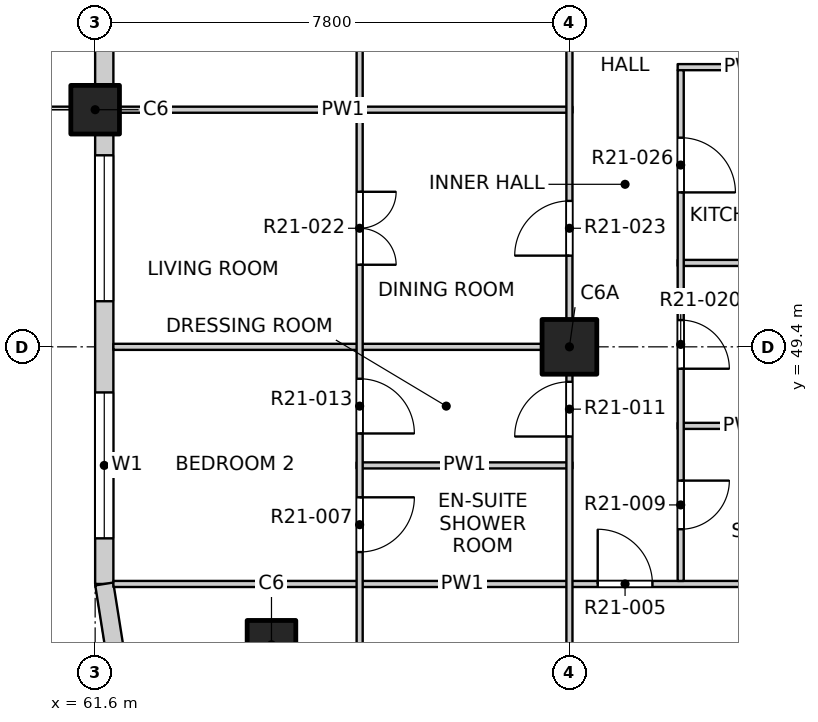
"""IFC4 building model, lengths in metres.
Left out: names, types, materials, properties, quantities, classifications, styles, units other than length and angle.
Written with IfcOpenShell. Run it as: python <this file> out.ifc"""

import sys

from ifc_helpers import new_model, si_unit, direction, frame, frame_2d, origin, origin_2d, place, context, subcontext, project, spatial, rectangle, extrude, element, fill, save


model = new_model("IFC4")
c1 = context("Model", 3, precision=1e-05, world=origin(), true_north=direction((0.0, 1.0)))
c2 = subcontext(c1, "Body", "Model", "MODEL_VIEW")
j1 = project(units=[si_unit("LENGTHUNIT", "METRE"), si_unit("PLANEANGLEUNIT", "RADIAN")], contexts=[c1])
p1 = place(None, origin())
s1 = spatial("IfcSite", under=j1, at=p1, CompositionType="ELEMENT")
p2 = place(p1, origin())
s2 = spatial("IfcBuilding", under=s1, at=p2, CompositionType="ELEMENT")
p3 = place(p2, frame((0.0, 0.0, 221.1)))
s3 = spatial("IfcBuildingStorey", under=s2, at=p3, CompositionType="ELEMENT", Elevation=221.1)
for number, where, z_axis, x_axis in (
    (1, (64.5, 44.5, -0.25), (0.0, 0.0, 1.0), (1.0, 0.0, 0.0)),
    (2, (61.6, 53.3, -0.25), (0.0, 0.0, 1.0), (1.0, 0.0, 0.0)),
):
    element("IfcColumn", number, at=place(p3, frame(where, z_axis=z_axis, x_axis=x_axis)), inside=s3, PredefinedType="COLUMN", context=c2, shape_type="SweptSolid", body=[
        extrude(rectangle(XDim=0.8, YDim=0.8, at=origin_2d()), origin(), (0.0, 0.0, 1.0), 3.4),
    ])
p4 = place(p3, frame((69.4, 49.4, -0.25), z_axis=(0.0, 0.0, 1.0), x_axis=(1.0, 0.0, 0.0)))
e3 = element("IfcColumn", 3, at=p4, inside=s3, PredefinedType="COLUMN", context=c2, shape_type="SweptSolid", body=[
    extrude(rectangle(XDim=0.9, YDim=0.9, at=origin_2d()), origin(), (0.0, 0.0, 1.0), 3.4),
])
p5 = place(p3, frame((61.75, 45.5, 0.0), z_axis=(0.0, 0.0, 1.0), x_axis=(0.0, 1.0, 0.0)))
e4 = element("IfcWall", 4, at=p5, inside=s3, PredefinedType="SOLIDWALL", context=c2, shape_type="SweptSolid", body=[
    extrude(rectangle(XDim=7.4, YDim=0.3, at=frame_2d((3.7, 0.0))), origin(), (0.0, 0.0, 1.0), 2.7),
])
p6 = place(p5, frame((0.75, 0.0, 0.9)))
e5 = element("IfcOpeningElement", 5, at=p6, cuts=e4, PredefinedType="OPENING", context=c2, shape_type="SweptSolid", body=[
    extrude(rectangle(XDim=2.4, YDim=1.8, at=frame_2d((1.2, 0.9))), frame((0.0, 0.16, 0.0), z_axis=(0.0, -1.0, 0.0), x_axis=(1.0, 0.0, 0.0)), (0.0, 0.0, 1.0), 0.32),
])
p7 = place(p5, frame((4.65, 0.0, 0.9)))
e6 = element("IfcOpeningElement", 6, at=p7, cuts=e4, PredefinedType="OPENING", context=c2, shape_type="SweptSolid", body=[
    extrude(rectangle(XDim=2.4, YDim=1.8, at=frame_2d((1.2, 0.9))), frame((0.0, 0.16, 0.0), z_axis=(0.0, -1.0, 0.0), x_axis=(1.0, 0.0, 0.0)), (0.0, 0.0, 1.0), 0.32),
])
p8 = place(p3, frame((61.75, 53.7, 0.0), z_axis=(0.0, 0.0, 1.0), x_axis=(0.0, 1.0, 0.0)))
e7 = element("IfcWall", 7, at=p8, inside=s3, PredefinedType="SOLIDWALL", context=c2, shape_type="SweptSolid", body=[
    extrude(rectangle(XDim=7.0, YDim=0.3, at=frame_2d((3.5, 0.0))), origin(), (0.0, 0.0, 1.0), 2.7),
])
p9 = place(p8, frame((0.65, 0.0, 0.0)))
e8 = element("IfcOpeningElement", 8, at=p9, cuts=e7, PredefinedType="OPENING", context=c2, shape_type="SweptSolid", body=[
    extrude(rectangle(XDim=1.8, YDim=2.4, at=frame_2d((0.9, 1.2))), frame((0.0, 0.16, 0.0), z_axis=(0.0, -1.0, 0.0), x_axis=(1.0, 0.0, 0.0)), (0.0, 0.0, 1.0), 0.32),
])
p10 = place(p8, frame((4.25, 0.0, 0.9)))
e9 = element("IfcOpeningElement", 9, at=p10, cuts=e7, PredefinedType="OPENING", context=c2, shape_type="SweptSolid", body=[
    extrude(rectangle(XDim=2.4, YDim=1.8, at=frame_2d((1.2, 0.9))), frame((0.0, 0.16, 0.0), z_axis=(0.0, -1.0, 0.0), x_axis=(1.0, 0.0, 0.0)), (0.0, 0.0, 1.0), 0.32),
])
p11 = place(p3, frame((61.75, 45.5, 0.0), z_axis=(0.0, 0.0, 1.0), x_axis=(0.156496880861, -0.987678452879, 0.0)))
e10 = element("IfcWall", 10, at=p11, inside=s3, PredefinedType="SOLIDWALL", context=c2, shape_type="SweptSolid", body=[
    extrude(rectangle(XDim=1.173, YDim=0.3, at=frame_2d((0.586, 0.0))), origin(), (0.0, 0.0, 1.0), 2.7),
])
p12 = place(p3, frame((61.9, 45.5, 0.0), z_axis=(0.0, 0.0, 1.0), x_axis=(1.0, 0.0, 0.0)))
e11 = element("IfcWall", 11, at=p12, inside=s3, PredefinedType="PARTITIONING", context=c2, shape_type="SweptSolid", body=[
    extrude(rectangle(XDim=11.475, YDim=0.1, at=frame_2d((5.737, 0.0))), origin(), (0.0, 0.0, 1.0), 3.15),
])
p13 = place(p12, frame((7.965, 0.0, 0.0)))
e12 = element("IfcOpeningElement", 12, at=p13, cuts=e11, PredefinedType="OPENING", context=c2, shape_type="SweptSolid", body=[
    extrude(rectangle(XDim=0.9, YDim=2.1, at=frame_2d((0.45, 1.05))), frame((0.0, 0.06, 0.0), z_axis=(0.0, -1.0, 0.0), x_axis=(1.0, 0.0, 0.0)), (0.0, 0.0, 1.0), 0.12),
])
p14 = place(p3, frame((65.9, 47.45, 0.0), z_axis=(0.0, 0.0, 1.0), x_axis=(1.0, 0.0, 0.0)))
e13 = element("IfcWall", 13, at=p14, inside=s3, PredefinedType="PARTITIONING", context=c2, shape_type="SweptSolid", body=[
    extrude(rectangle(XDim=3.55, YDim=0.1, at=frame_2d((1.775, 0.0))), origin(), (0.0, 0.0, 1.0), 3.15),
])
p15 = place(p3, frame((71.18, 48.1, 0.0), z_axis=(0.0, 0.0, 1.0), x_axis=(1.0, 0.0, 0.0)))
e14 = element("IfcWall", 14, at=p15, inside=s3, PredefinedType="PARTITIONING", context=c2, shape_type="SweptSolid", body=[
    extrude(rectangle(XDim=2.195, YDim=0.1, at=frame_2d((1.097, 0.0))), origin(), (0.0, 0.0, 1.0), 3.15),
])
p16 = place(p3, frame((61.9, 49.4, 0.0), z_axis=(0.0, 0.0, 1.0), x_axis=(1.0, 0.0, 0.0)))
e15 = element("IfcWall", 15, at=p16, inside=s3, PredefinedType="PARTITIONING", context=c2, shape_type="SweptSolid", body=[
    extrude(rectangle(XDim=7.55, YDim=0.1, at=frame_2d((3.775, 0.0))), origin(), (0.0, 0.0, 1.0), 3.15),
])
p17 = place(p3, frame((71.18, 50.78, 0.0), z_axis=(0.0, 0.0, 1.0), x_axis=(1.0, 0.0, 0.0)))
e16 = element("IfcWall", 16, at=p17, inside=s3, PredefinedType="PARTITIONING", context=c2, shape_type="SweptSolid", body=[
    extrude(rectangle(XDim=2.22, YDim=0.1, at=frame_2d((1.11, 0.0))), origin(), (0.0, 0.0, 1.0), 3.15),
])
p18 = place(p3, frame((61.9, 53.3, 0.0), z_axis=(0.0, 0.0, 1.0), x_axis=(1.0, 0.0, 0.0)))
e17 = element("IfcWall", 17, at=p18, inside=s3, PredefinedType="PARTITIONING", context=c2, shape_type="SweptSolid", body=[
    extrude(rectangle(XDim=7.55, YDim=0.1, at=frame_2d((3.775, 0.0))), origin(), (0.0, 0.0, 1.0), 3.15),
])
p19 = place(p3, frame((71.18, 54.0, 0.0), z_axis=(0.0, 0.0, 1.0), x_axis=(1.0, 0.0, 0.0)))
e18 = element("IfcWall", 18, at=p19, inside=s3, PredefinedType="PARTITIONING", context=c2, shape_type="SweptSolid", body=[
    extrude(rectangle(XDim=2.22, YDim=0.1, at=frame_2d((1.11, 0.0))), origin(), (0.0, 0.0, 1.0), 3.15),
])
p20 = place(p3, frame((65.95, 41.9, 0.0), z_axis=(0.0, 0.0, 1.0), x_axis=(0.0, 1.0, 0.0)))
e19 = element("IfcWall", 19, at=p20, inside=s3, PredefinedType="PARTITIONING", context=c2, shape_type="SweptSolid", body=[
    extrude(rectangle(XDim=19.1, YDim=0.1, at=frame_2d((9.55, 0.0))), origin(), (0.0, 0.0, 1.0), 3.15),
])
p21 = place(p20, frame((1.05, 0.0, 0.0)))
e20 = element("IfcOpeningElement", 20, at=p21, cuts=e19, PredefinedType="OPENING", context=c2, shape_type="SweptSolid", body=[
    extrude(rectangle(XDim=1.2, YDim=2.1, at=frame_2d((0.6, 1.05))), frame((0.0, 0.06, 0.0), z_axis=(0.0, -1.0, 0.0), x_axis=(1.0, 0.0, 0.0)), (0.0, 0.0, 1.0), 0.12),
])
p22 = place(p20, frame((4.125, 0.0, 0.0)))
e21 = element("IfcOpeningElement", 21, at=p22, cuts=e19, PredefinedType="OPENING", context=c2, shape_type="SweptSolid", body=[
    extrude(rectangle(XDim=0.9, YDim=2.1, at=frame_2d((0.45, 1.05))), frame((0.0, 0.06, 0.0), z_axis=(0.0, -1.0, 0.0), x_axis=(1.0, 0.0, 0.0)), (0.0, 0.0, 1.0), 0.12),
])
p23 = place(p20, frame((6.075, 0.0, 0.0)))
e22 = element("IfcOpeningElement", 22, at=p23, cuts=e19, PredefinedType="OPENING", context=c2, shape_type="SweptSolid", body=[
    extrude(rectangle(XDim=0.9, YDim=2.1, at=frame_2d((0.45, 1.05))), frame((0.0, 0.06, 0.0), z_axis=(0.0, -1.0, 0.0), x_axis=(1.0, 0.0, 0.0)), (0.0, 0.0, 1.0), 0.12),
])
p24 = place(p20, frame((8.85, 0.0, 0.0)))
e23 = element("IfcOpeningElement", 23, at=p24, cuts=e19, PredefinedType="OPENING", context=c2, shape_type="SweptSolid", body=[
    extrude(rectangle(XDim=1.2, YDim=2.1, at=frame_2d((0.6, 1.05))), frame((0.0, 0.06, 0.0), z_axis=(0.0, -1.0, 0.0), x_axis=(1.0, 0.0, 0.0)), (0.0, 0.0, 1.0), 0.12),
])
p25 = place(p20, frame((12.75, 0.0, 0.0)))
e24 = element("IfcOpeningElement", 24, at=p25, cuts=e19, PredefinedType="OPENING", context=c2, shape_type="SweptSolid", body=[
    extrude(rectangle(XDim=1.2, YDim=2.1, at=frame_2d((0.6, 1.05))), frame((0.0, 0.06, 0.0), z_axis=(0.0, -1.0, 0.0), x_axis=(1.0, 0.0, 0.0)), (0.0, 0.0, 1.0), 0.12),
])
p26 = place(p20, frame((15.825, 0.0, 0.0)))
e25 = element("IfcOpeningElement", 25, at=p26, cuts=e19, PredefinedType="OPENING", context=c2, shape_type="SweptSolid", body=[
    extrude(rectangle(XDim=0.9, YDim=2.1, at=frame_2d((0.45, 1.05))), frame((0.0, 0.06, 0.0), z_axis=(0.0, -1.0, 0.0), x_axis=(1.0, 0.0, 0.0)), (0.0, 0.0, 1.0), 0.12),
])
p27 = place(p20, frame((17.775, 0.0, 0.0)))
e26 = element("IfcOpeningElement", 26, at=p27, cuts=e19, PredefinedType="OPENING", context=c2, shape_type="SweptSolid", body=[
    extrude(rectangle(XDim=0.9, YDim=2.1, at=frame_2d((0.45, 1.05))), frame((0.0, 0.06, 0.0), z_axis=(0.0, -1.0, 0.0), x_axis=(1.0, 0.0, 0.0)), (0.0, 0.0, 1.0), 0.12),
])
p28 = place(p3, frame((69.4, 41.9, 0.0), z_axis=(0.0, 0.0, 1.0), x_axis=(0.0, 1.0, 0.0)))
e27 = element("IfcWall", 27, at=p28, inside=s3, PredefinedType="PARTITIONING", context=c2, shape_type="SweptSolid", body=[
    extrude(rectangle(XDim=46.2, YDim=0.1, at=frame_2d((23.1, 0.0))), origin(), (0.0, 0.0, 1.0), 3.15),
])
p29 = place(p28, frame((1.2, 0.0, 0.0)))
e28 = element("IfcOpeningElement", 28, at=p29, cuts=e27, PredefinedType="OPENING", context=c2, shape_type="SweptSolid", body=[
    extrude(rectangle(XDim=0.9, YDim=2.1, at=frame_2d((0.45, 1.05))), frame((0.0, 0.06, 0.0), z_axis=(0.0, -1.0, 0.0), x_axis=(1.0, 0.0, 0.0)), (0.0, 0.0, 1.0), 0.12),
])
p30 = place(p28, frame((6.025, 0.0, 0.0)))
e29 = element("IfcOpeningElement", 29, at=p30, cuts=e27, PredefinedType="OPENING", context=c2, shape_type="SweptSolid", body=[
    extrude(rectangle(XDim=0.9, YDim=2.1, at=frame_2d((0.45, 1.05))), frame((0.0, 0.06, 0.0), z_axis=(0.0, -1.0, 0.0), x_axis=(1.0, 0.0, 0.0)), (0.0, 0.0, 1.0), 0.12),
])
p31 = place(p28, frame((9.0, 0.0, 0.0)))
e30 = element("IfcOpeningElement", 30, at=p31, cuts=e27, PredefinedType="OPENING", context=c2, shape_type="SweptSolid", body=[
    extrude(rectangle(XDim=0.9, YDim=2.1, at=frame_2d((0.45, 1.05))), frame((0.0, 0.06, 0.0), z_axis=(0.0, -1.0, 0.0), x_axis=(1.0, 0.0, 0.0)), (0.0, 0.0, 1.0), 0.12),
])
p32 = place(p28, frame((12.9, 0.0, 0.0)))
e31 = element("IfcOpeningElement", 31, at=p32, cuts=e27, PredefinedType="OPENING", context=c2, shape_type="SweptSolid", body=[
    extrude(rectangle(XDim=0.9, YDim=2.1, at=frame_2d((0.45, 1.05))), frame((0.0, 0.06, 0.0), z_axis=(0.0, -1.0, 0.0), x_axis=(1.0, 0.0, 0.0)), (0.0, 0.0, 1.0), 0.12),
])
p33 = place(p28, frame((17.775, 0.0, 0.0)))
e32 = element("IfcOpeningElement", 32, at=p33, cuts=e27, PredefinedType="OPENING", context=c2, shape_type="SweptSolid", body=[
    extrude(rectangle(XDim=0.9, YDim=2.1, at=frame_2d((0.45, 1.05))), frame((0.0, 0.06, 0.0), z_axis=(0.0, -1.0, 0.0), x_axis=(1.0, 0.0, 0.0)), (0.0, 0.0, 1.0), 0.12),
])
p34 = place(p28, frame((20.7, 0.0, 0.0)))
e33 = element("IfcOpeningElement", 33, at=p34, cuts=e27, PredefinedType="OPENING", context=c2, shape_type="SweptSolid", body=[
    extrude(rectangle(XDim=0.9, YDim=2.1, at=frame_2d((0.45, 1.05))), frame((0.0, 0.06, 0.0), z_axis=(0.0, -1.0, 0.0), x_axis=(1.0, 0.0, 0.0)), (0.0, 0.0, 1.0), 0.12),
])
p35 = place(p28, frame((24.6, 0.0, 0.0)))
e34 = element("IfcOpeningElement", 34, at=p35, cuts=e27, PredefinedType="OPENING", context=c2, shape_type="SweptSolid", body=[
    extrude(rectangle(XDim=0.9, YDim=2.1, at=frame_2d((0.45, 1.05))), frame((0.0, 0.06, 0.0), z_axis=(0.0, -1.0, 0.0), x_axis=(1.0, 0.0, 0.0)), (0.0, 0.0, 1.0), 0.12),
])
p36 = place(p28, frame((29.425, 0.0, 0.0)))
e35 = element("IfcOpeningElement", 35, at=p36, cuts=e27, PredefinedType="OPENING", context=c2, shape_type="SweptSolid", body=[
    extrude(rectangle(XDim=0.9, YDim=2.1, at=frame_2d((0.45, 1.05))), frame((0.0, 0.06, 0.0), z_axis=(0.0, -1.0, 0.0), x_axis=(1.0, 0.0, 0.0)), (0.0, 0.0, 1.0), 0.12),
])
p37 = place(p28, frame((33.375, 0.0, 0.0)))
e36 = element("IfcOpeningElement", 36, at=p37, cuts=e27, PredefinedType="OPENING", context=c2, shape_type="SweptSolid", body=[
    extrude(rectangle(XDim=0.9, YDim=2.1, at=frame_2d((0.45, 1.05))), frame((0.0, 0.06, 0.0), z_axis=(0.0, -1.0, 0.0), x_axis=(1.0, 0.0, 0.0)), (0.0, 0.0, 1.0), 0.12),
])
p38 = place(p28, frame((36.3, 0.0, 0.0)))
e37 = element("IfcOpeningElement", 37, at=p38, cuts=e27, PredefinedType="OPENING", context=c2, shape_type="SweptSolid", body=[
    extrude(rectangle(XDim=0.9, YDim=2.1, at=frame_2d((0.45, 1.05))), frame((0.0, 0.06, 0.0), z_axis=(0.0, -1.0, 0.0), x_axis=(1.0, 0.0, 0.0)), (0.0, 0.0, 1.0), 0.12),
])
p39 = place(p28, frame((41.175, 0.0, 0.0)))
e38 = element("IfcOpeningElement", 38, at=p39, cuts=e27, PredefinedType="OPENING", context=c2, shape_type="SweptSolid", body=[
    extrude(rectangle(XDim=0.9, YDim=2.1, at=frame_2d((0.45, 1.05))), frame((0.0, 0.06, 0.0), z_axis=(0.0, -1.0, 0.0), x_axis=(1.0, 0.0, 0.0)), (0.0, 0.0, 1.0), 0.12),
])
p40 = place(p28, frame((44.1, 0.0, 0.0)))
e39 = element("IfcOpeningElement", 39, at=p40, cuts=e27, PredefinedType="OPENING", context=c2, shape_type="SweptSolid", body=[
    extrude(rectangle(XDim=0.9, YDim=2.1, at=frame_2d((0.45, 1.05))), frame((0.0, 0.06, 0.0), z_axis=(0.0, -1.0, 0.0), x_axis=(1.0, 0.0, 0.0)), (0.0, 0.0, 1.0), 0.12),
])
p41 = place(p3, frame((71.23, 45.55, 0.0), z_axis=(0.0, 0.0, 1.0), x_axis=(0.0, 1.0, 0.0)))
e40 = element("IfcWall", 40, at=p41, inside=s3, PredefinedType="PARTITIONING", context=c2, shape_type="SweptSolid", body=[
    extrude(rectangle(XDim=8.4, YDim=0.1, at=frame_2d((4.2, 0.0))), origin(), (0.0, 0.0, 1.0), 3.15),
])
p42 = place(p41, frame((0.85, 0.0, 0.0)))
e41 = element("IfcOpeningElement", 41, at=p42, cuts=e40, PredefinedType="OPENING", context=c2, shape_type="SweptSolid", body=[
    extrude(rectangle(XDim=0.8, YDim=2.1, at=frame_2d((0.4, 1.05))), frame((0.0, 0.06, 0.0), z_axis=(0.0, -1.0, 0.0), x_axis=(1.0, 0.0, 0.0)), (0.0, 0.0, 1.0), 0.12),
])
p43 = place(p41, frame((3.49, 0.0, 0.0)))
e42 = element("IfcOpeningElement", 42, at=p43, cuts=e40, PredefinedType="OPENING", context=c2, shape_type="SweptSolid", body=[
    extrude(rectangle(XDim=0.8, YDim=2.1, at=frame_2d((0.4, 1.05))), frame((0.0, 0.06, 0.0), z_axis=(0.0, -1.0, 0.0), x_axis=(1.0, 0.0, 0.0)), (0.0, 0.0, 1.0), 0.12),
])
p44 = place(p41, frame((6.39, 0.0, 0.0)))
e43 = element("IfcOpeningElement", 43, at=p44, cuts=e40, PredefinedType="OPENING", context=c2, shape_type="SweptSolid", body=[
    extrude(rectangle(XDim=0.9, YDim=2.1, at=frame_2d((0.45, 1.05))), frame((0.0, 0.06, 0.0), z_axis=(0.0, -1.0, 0.0), x_axis=(1.0, 0.0, 0.0)), (0.0, 0.0, 1.0), 0.12),
])
p45 = place(p6, origin())
e44 = element("IfcWindow", 44, at=p45, inside=s3, PartitioningType="DOUBLE_PANEL_VERTICAL", PredefinedType="WINDOW", context=c2, shape_type="SweptSolid", body=[
    extrude(rectangle(XDim=2.4, YDim=1.8, at=frame_2d((1.2, 0.9))), frame((0.0, 0.03, 0.0), z_axis=(0.0, -1.0, 0.0), x_axis=(1.0, 0.0, 0.0)), (0.0, 0.0, 1.0), 0.06),
])
fill(e5, e44)
p46 = place(p7, origin())
e45 = element("IfcWindow", 45, at=p46, inside=s3, PartitioningType="DOUBLE_PANEL_VERTICAL", PredefinedType="WINDOW", context=c2, shape_type="SweptSolid", body=[
    extrude(rectangle(XDim=2.4, YDim=1.8, at=frame_2d((1.2, 0.9))), frame((0.0, 0.03, 0.0), z_axis=(0.0, -1.0, 0.0), x_axis=(1.0, 0.0, 0.0)), (0.0, 0.0, 1.0), 0.06),
])
fill(e6, e45)
p47 = place(p13, origin())
e46 = element("IfcDoor", 46, at=p47, inside=s3, OperationType="SINGLE_SWING_LEFT", PredefinedType="DOOR", context=c2, shape_type="SweptSolid", body=[
    extrude(rectangle(XDim=0.9, YDim=2.1, at=frame_2d((0.45, 1.05))), frame((0.0, 0.025, 0.0), z_axis=(0.0, -1.0, 0.0), x_axis=(1.0, 0.0, 0.0)), (0.0, 0.0, 1.0), 0.05),
])
fill(e12, e46)
p48 = place(p22, origin())
e47 = element("IfcDoor", 47, at=p48, inside=s3, OperationType="SINGLE_SWING_LEFT", PredefinedType="DOOR", context=c2, shape_type="SweptSolid", body=[
    extrude(rectangle(XDim=0.9, YDim=2.1, at=frame_2d((0.45, 1.05))), frame((0.0, 0.025, 0.0), z_axis=(0.0, -1.0, 0.0), x_axis=(1.0, 0.0, 0.0)), (0.0, 0.0, 1.0), 0.05),
])
fill(e21, e47)
p49 = place(p42, origin())
e48 = element("IfcDoor", 48, at=p49, inside=s3, OperationType="SINGLE_SWING_LEFT", PredefinedType="DOOR", context=c2, shape_type="SweptSolid", body=[
    extrude(rectangle(XDim=0.8, YDim=2.1, at=frame_2d((0.4, 1.05))), frame((0.0, 0.025, 0.0), z_axis=(0.0, -1.0, 0.0), x_axis=(1.0, 0.0, 0.0)), (0.0, 0.0, 1.0), 0.05),
])
fill(e41, e48)
p50 = place(p30, origin())
e49 = element("IfcDoor", 49, at=p50, inside=s3, OperationType="SINGLE_SWING_LEFT", PredefinedType="DOOR", context=c2, shape_type="SweptSolid", body=[
    extrude(rectangle(XDim=0.9, YDim=2.1, at=frame_2d((0.45, 1.05))), frame((0.0, 0.025, 0.0), z_axis=(0.0, -1.0, 0.0), x_axis=(1.0, 0.0, 0.0)), (0.0, 0.0, 1.0), 0.05),
])
fill(e29, e49)
p51 = place(p23, origin())
e50 = element("IfcDoor", 50, at=p51, inside=s3, OperationType="SINGLE_SWING_RIGHT", PredefinedType="DOOR", context=c2, shape_type="SweptSolid", body=[
    extrude(rectangle(XDim=0.9, YDim=2.1, at=frame_2d((0.45, 1.05))), frame((0.0, 0.025, 0.0), z_axis=(0.0, -1.0, 0.0), x_axis=(1.0, 0.0, 0.0)), (0.0, 0.0, 1.0), 0.05),
])
fill(e22, e50)
p52 = place(p43, origin())
e51 = element("IfcDoor", 51, at=p52, inside=s3, OperationType="SINGLE_SWING_RIGHT", PredefinedType="DOOR", context=c2, shape_type="SweptSolid", body=[
    extrude(rectangle(XDim=0.8, YDim=2.1, at=frame_2d((0.4, 1.05))), frame((0.0, 0.025, 0.0), z_axis=(0.0, -1.0, 0.0), x_axis=(1.0, 0.0, 0.0)), (0.0, 0.0, 1.0), 0.05),
])
fill(e42, e51)
p53 = place(p24, origin())
e52 = element("IfcDoor", 52, at=p53, inside=s3, OperationType="DOUBLE_DOOR_SINGLE_SWING", PredefinedType="DOOR", context=c2, shape_type="SweptSolid", body=[
    extrude(rectangle(XDim=1.2, YDim=2.1, at=frame_2d((0.6, 1.05))), frame((0.0, 0.025, 0.0), z_axis=(0.0, -1.0, 0.0), x_axis=(1.0, 0.0, 0.0)), (0.0, 0.0, 1.0), 0.05),
])
fill(e23, e52)
p54 = place(p31, origin())
e53 = element("IfcDoor", 53, at=p54, inside=s3, OperationType="SINGLE_SWING_LEFT", PredefinedType="DOOR", context=c2, shape_type="SweptSolid", body=[
    extrude(rectangle(XDim=0.9, YDim=2.1, at=frame_2d((0.45, 1.05))), frame((0.0, 0.025, 0.0), z_axis=(0.0, -1.0, 0.0), x_axis=(1.0, 0.0, 0.0)), (0.0, 0.0, 1.0), 0.05),
])
fill(e30, e53)
p55 = place(p44, origin())
e54 = element("IfcDoor", 54, at=p55, inside=s3, OperationType="SINGLE_SWING_RIGHT", PredefinedType="DOOR", context=c2, shape_type="SweptSolid", body=[
    extrude(rectangle(XDim=0.9, YDim=2.1, at=frame_2d((0.45, 1.05))), frame((0.0, 0.025, 0.0), z_axis=(0.0, -1.0, 0.0), x_axis=(1.0, 0.0, 0.0)), (0.0, 0.0, 1.0), 0.05),
])
fill(e43, e54)
save(model, sys.argv[1])
